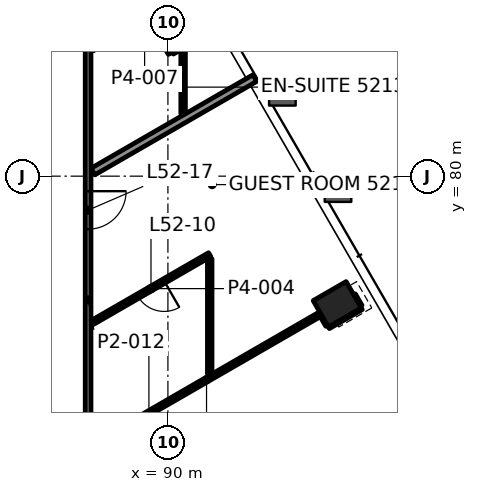
"""IFC4 building model, lengths in metres.
Left out: names, types, materials, properties, quantities, classifications, styles, units other than length and angle.
Written with IfcOpenShell. Run it as: python <this file> out.ifc"""

import sys

from ifc_helpers import new_model, si_unit, direction, frame, frame_2d, origin, origin_2d, place, context, subcontext, project, spatial, rectangle, hollow_rectangle, extrude, element, fill, save


model = new_model("IFC4")
c1 = context("Model", 3, precision=1e-05, world=origin(), true_north=direction((0.0, 1.0)))
c2 = subcontext(c1, "Body", "Model", "MODEL_VIEW")
j1 = project(units=[si_unit("LENGTHUNIT", "METRE"), si_unit("PLANEANGLEUNIT", "RADIAN")], contexts=[c1])
p1 = place(None, origin())
s1 = spatial("IfcSite", under=j1, at=p1, CompositionType="ELEMENT")
p2 = place(p1, origin())
s2 = spatial("IfcBuilding", under=s1, at=p2, CompositionType="ELEMENT")
p3 = place(p2, frame((0.0, 0.0, 222.1)))
s3 = spatial("IfcBuildingStorey", under=s2, at=p3, CompositionType="ELEMENT", Elevation=222.1)
for number, where, z_axis, x_axis in (
    (1, (94.456, 76.628, -0.0), (0.0, 0.0, 1.0), (-0.5, 0.866, 0.0)),
    (2, (90.297, 83.832, -0.0), (0.0, 0.0, 1.0), (-0.5, 0.866, 0.0)),
):
    element("IfcColumn", number, at=place(p3, frame(where, z_axis=z_axis, x_axis=x_axis)), inside=s3, PredefinedType="COLUMN", context=c2, shape_type="SweptSolid", body=[
        extrude(hollow_rectangle(XDim=0.8, YDim=1.0, WallThickness=0.05, at=origin_2d()), origin(), (0.0, 0.0, 1.0), 3.9),
    ])
p4 = place(p3, frame((94.223, 76.032, 0.0), z_axis=(0.0, 0.0, 1.0), x_axis=(0.86597798544, 0.50008212199, 0.0)))
e3 = element("IfcWall", 3, at=p4, inside=s3, PredefinedType="PARTITIONING", context=c2, shape_type="SweptSolid", body=[
    extrude(rectangle(XDim=0.999, YDim=0.1, at=frame_2d((0.5, 0.0))), origin(), (0.0, 0.0, 1.0), 3.022),
])
p5 = place(p3, frame((88.01, 72.906, 0.0), z_axis=(0.0, 0.0, 1.0), x_axis=(0.866025136247, 0.500000463387, 0.0)))
e4 = element("IfcWall", 4, at=p5, inside=s3, PredefinedType="PARTITIONING", context=c2, shape_type="SweptSolid", body=[
    extrude(rectangle(XDim=6.943, YDim=0.12, at=frame_2d((3.471, 0.0))), origin(), (0.0, 0.0, 1.0), 3.1),
])
p6 = place(p3, frame((91.1, 77.933, 0.0), z_axis=(0.0, 0.0, 1.0), x_axis=(-0.866045460162, -0.499965259726, 0.0)))
e5 = element("IfcWall", 5, at=p6, inside=s3, PredefinedType="PARTITIONING", context=c2, shape_type="SweptSolid", body=[
    extrude(rectangle(XDim=3.569, YDim=0.12, at=frame_2d((1.784, 0.0))), origin(), (0.0, 0.0, 1.0), 3.1),
])
p7 = place(p6, frame((1.384, 0.0, 0.0)))
e6 = element("IfcOpeningElement", 6, at=p7, cuts=e5, PredefinedType="OPENING", context=c2, shape_type="SweptSolid", body=[
    extrude(rectangle(XDim=0.8, YDim=2.1, at=frame_2d((0.4, 1.05))), frame((0.0, 0.07, 0.0), z_axis=(0.0, -1.0, 0.0), x_axis=(1.0, 0.0, 0.0)), (0.0, 0.0, 1.0), 0.14),
])
p8 = place(p3, frame((88.027, 80.12, 0.0), z_axis=(0.0, 0.0, 1.0), x_axis=(0.866024509183, 0.500001549491, 0.0)))
e7 = element("IfcWall", 7, at=p8, inside=s3, PredefinedType="PARTITIONING", context=c2, shape_type="SweptSolid", body=[
    extrude(rectangle(XDim=4.922, YDim=0.2, at=frame_2d((2.461, 0.0))), origin(), (0.0, 0.0, 1.0), 3.022),
])
p9 = place(p3, frame((90.116, 83.265, 0.0), z_axis=(0.0, 0.0, 1.0), x_axis=(0.866036909293, 0.499980071345, 0.0)))
e8 = element("IfcWall", 8, at=p9, inside=s3, PredefinedType="PARTITIONING", context=c2, shape_type="SweptSolid", body=[
    extrude(rectangle(XDim=0.219, YDim=0.12, at=frame_2d((0.109, 0.0))), origin(), (0.0, 0.0, 1.0), 3.1),
])
p10 = place(p3, frame((91.1, 74.8, 0.0), z_axis=(0.0, 0.0, 1.0), x_axis=(0.0, 1.0, 0.0)))
e9 = element("IfcWall", 9, at=p10, inside=s3, PredefinedType="PARTITIONING", context=c2, shape_type="SweptSolid", body=[
    extrude(rectangle(XDim=3.023, YDim=0.12, at=frame_2d((1.511, 0.0))), origin(), (0.0, 0.0, 1.0), 3.1),
])
p11 = place(p3, frame((90.4, 81.646, 0.0), z_axis=(0.0, 0.0, 1.0), x_axis=(0.0, 1.0, 0.0)))
e10 = element("IfcWall", 10, at=p11, inside=s3, PredefinedType="PARTITIONING", context=c2, shape_type="SweptSolid", body=[
    extrude(rectangle(XDim=1.784, YDim=0.12, at=frame_2d((0.892, 0.0))), origin(), (0.0, 0.0, 1.0), 3.022),
])
p12 = place(p3, frame((87.9, 84.899, 0.0), z_axis=(0.0, 0.0, 1.0), x_axis=(0.0, -1.0, 0.0)))
e11 = element("IfcWall", 11, at=p12, inside=s3, PredefinedType="PARTITIONING", context=c2, shape_type="SweptSolid", body=[
    extrude(rectangle(XDim=16.308, YDim=0.15, at=frame_2d((8.154, 0.0))), origin(), (0.0, 0.0, 1.0), 3.1),
])
p13 = place(p12, frame((5.294, 0.0, 0.0)))
e12 = element("IfcOpeningElement", 12, at=p13, cuts=e11, PredefinedType="OPENING", context=c2, shape_type="SweptSolid", body=[
    extrude(rectangle(XDim=1.0, YDim=2.1, at=frame_2d((0.5, 1.05))), frame((0.0, 0.085, 0.0), z_axis=(0.0, -1.0, 0.0), x_axis=(1.0, 0.0, 0.0)), (0.0, 0.0, 1.0), 0.17),
])
p14 = place(p12, frame((13.58, 0.0, 0.0)))
e13 = element("IfcOpeningElement", 13, at=p14, cuts=e11, PredefinedType="OPENING", context=c2, shape_type="SweptSolid", body=[
    extrude(rectangle(XDim=1.0, YDim=2.1, at=frame_2d((0.5, 1.05))), frame((0.0, 0.085, 0.0), z_axis=(0.0, -1.0, 0.0), x_axis=(1.0, 0.0, 0.0)), (0.0, 0.0, 1.0), 0.17),
])
p15 = place(p3, frame((95.063, 76.576, 0.0), z_axis=(0.0, 0.0, 1.0), x_axis=(-0.500126092966, 0.865952591736, 0.0)))
e14 = element("IfcWall", 14, at=p15, inside=s3, PredefinedType="PARTITIONING", context=c2, shape_type="SweptSolid", body=[
    extrude(rectangle(XDim=0.349, YDim=0.1, at=frame_2d((0.175, 0.0))), origin(), (0.0, 0.0, 1.0), 3.1),
])
p16 = place(p3, frame((94.197, 76.076, 0.0), z_axis=(0.0, 0.0, 1.0), x_axis=(-0.500136839105, 0.865946385275, 0.0)))
e15 = element("IfcWall", 15, at=p16, inside=s3, PredefinedType="PARTITIONING", context=c2, shape_type="SweptSolid", body=[
    extrude(rectangle(XDim=0.289, YDim=0.1, at=frame_2d((0.145, 0.0))), origin(), (0.0, 0.0, 1.0), 3.1),
])
p17 = place(p3, frame((90.064, 83.235, 0.0), z_axis=(0.0, 0.0, 1.0), x_axis=(-0.500112705049, 0.865960323715, 0.0)))
e16 = element("IfcWall", 16, at=p17, inside=s3, PredefinedType="PARTITIONING", context=c2, shape_type="SweptSolid", body=[
    extrude(rectangle(XDim=0.74, YDim=0.12, at=frame_2d((0.37, 0.0))), origin(), (0.0, 0.0, 1.0), 3.1),
])
p18 = place(p7, origin())
e17 = element("IfcDoor", 17, at=p18, inside=s3, OperationType="SINGLE_SWING_LEFT", PredefinedType="DOOR", context=c2, shape_type="SweptSolid", body=[
    extrude(rectangle(XDim=0.8, YDim=2.1, at=frame_2d((0.4, 1.05))), frame((0.0, 0.025, 0.0), z_axis=(0.0, -1.0, 0.0), x_axis=(1.0, 0.0, 0.0)), (0.0, 0.0, 1.0), 0.05),
])
fill(e6, e17)
p19 = place(p13, origin())
e18 = element("IfcDoor", 18, at=p19, inside=s3, OperationType="SINGLE_SWING_RIGHT", PredefinedType="DOOR", context=c2, shape_type="SweptSolid", body=[
    extrude(rectangle(XDim=1.0, YDim=2.1, at=frame_2d((0.5, 1.05))), frame((0.0, 0.025, 0.0), z_axis=(0.0, -1.0, 0.0), x_axis=(1.0, 0.0, 0.0)), (0.0, 0.0, 1.0), 0.05),
])
fill(e12, e18)
save(model, sys.argv[1])
